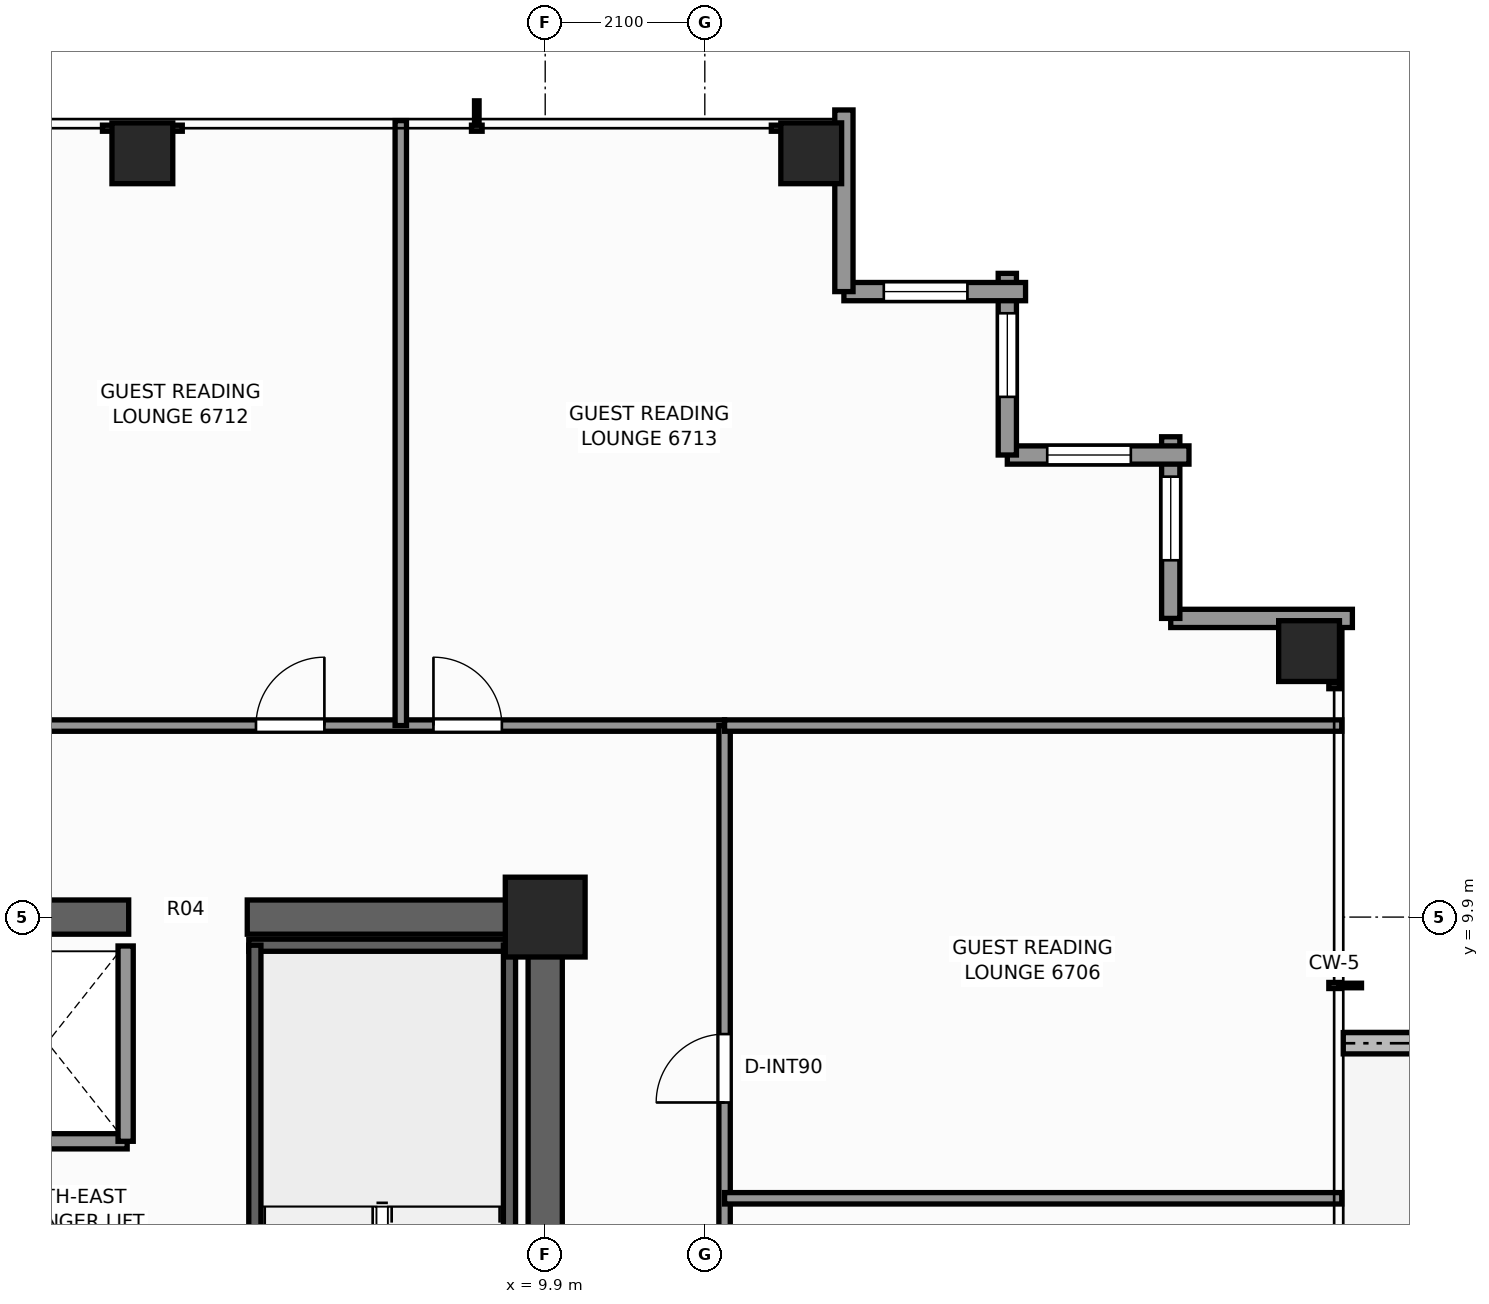
"""IFC4 building model, lengths in metres.
Left out: names, types, materials, properties, quantities, classifications, styles, units other than length and angle.
Written with IfcOpenShell. Run it as: python <this file> out.ifc"""

import sys

from ifc_helpers import new_model, si_unit, direction, frame, frame_2d, origin, origin_2d, place, context, subcontext, project, spatial, rectangle, extrude, element, fill, save


model = new_model("IFC4")
c1 = context("Model", 3, precision=1e-05, world=origin(), true_north=direction((0.0, 1.0)))
c2 = subcontext(c1, "Body", "Model", "MODEL_VIEW")
j1 = project(units=[si_unit("LENGTHUNIT", "METRE"), si_unit("PLANEANGLEUNIT", "RADIAN")], contexts=[c1])
p1 = place(None, origin())
s1 = spatial("IfcSite", under=j1, at=p1, CompositionType="ELEMENT")
p2 = place(p1, origin())
s2 = spatial("IfcBuilding", under=s1, at=p2, CompositionType="ELEMENT")
p3 = place(p2, frame((0.0, 0.0, 229.5)))
s3 = spatial("IfcBuildingStorey", under=s2, at=p3, CompositionType="ELEMENT", Elevation=229.5)
p4 = place(p3, frame((-10.125, 9.9, 0.0), z_axis=(0.0, 0.0, 1.0), x_axis=(1.0, 0.0, 0.0)))
e1 = element("IfcWall", 1, at=p4, inside=s3, PredefinedType="SHEAR", context=c2, shape_type="SweptSolid", body=[
    extrude(rectangle(XDim=14.545, YDim=0.45, at=frame_2d((7.272, 0.0))), origin(), (0.0, 0.0, 1.0), 3.3),
])
p5 = place(p3, frame((5.98, 9.9, 0.0), z_axis=(0.0, 0.0, 1.0), x_axis=(1.0, 0.0, 0.0)))
e2 = element("IfcWall", 2, at=p5, inside=s3, PredefinedType="SHEAR", context=c2, shape_type="SweptSolid", body=[
    extrude(rectangle(XDim=4.145, YDim=0.45, at=frame_2d((2.073, 0.0))), origin(), (0.0, 0.0, 1.0), 3.3),
])
p6 = place(p3, frame((9.9, -3.7, 0.0), z_axis=(0.0, 0.0, 1.0), x_axis=(0.0, 1.0, 0.0)))
e3 = element("IfcWall", 3, at=p6, inside=s3, PredefinedType="SHEAR", context=c2, shape_type="SweptSolid", body=[
    extrude(rectangle(XDim=13.375, YDim=0.45, at=frame_2d((6.688, 0.0))), origin(), (0.0, 0.0, 1.0), 3.3),
])
p7 = place(p6, frame((0.35, 0.0, 0.0)))
e4 = element("IfcOpeningElement", 4, at=p7, cuts=e3, PredefinedType="OPENING", context=c2, shape_type="SweptSolid", body=[
    extrude(rectangle(XDim=1.1, YDim=2.2, at=frame_2d((0.55, 1.1))), frame((0.0, 0.235, 0.0), z_axis=(0.0, -1.0, 0.0), x_axis=(1.0, 0.0, 0.0)), (0.0, 0.0, 1.0), 0.47),
])
p8 = place(p3, frame((9.9, 9.9, 0.0), z_axis=(0.0, 0.0, 1.0), x_axis=(1.0, 0.0, 0.0)))
e5 = element("IfcColumn", 5, at=p8, inside=s3, PredefinedType="COLUMN", context=c2, shape_type="SweptSolid", body=[
    extrude(rectangle(XDim=1.05, YDim=1.05, at=origin_2d()), origin(), (0.0, 0.0, 1.0), 3.3),
])
for number, where, z_axis, x_axis in (
    (6, (4.6, 19.95, 0.0), (0.0, 0.0, 1.0), (1.0, 0.0, 0.0)),
    (7, (13.4, 19.95, 0.0), (0.0, 0.0, 1.0), (1.0, 0.0, 0.0)),
    (8, (19.95, 13.4, 0.0), (0.0, 0.0, 1.0), (1.0, 0.0, 0.0)),
):
    element("IfcColumn", number, at=place(p3, frame(where, z_axis=z_axis, x_axis=x_axis)), inside=s3, PredefinedType="COLUMN", context=c2, shape_type="SweptSolid", body=[
        extrude(rectangle(XDim=0.8, YDim=0.8, at=origin_2d()), origin(), (0.0, 0.0, 1.0), 3.3),
    ])
p9 = place(p3, frame((21.713, 8.24, -0.04), z_axis=(0.0, 0.0, 1.0), x_axis=(-1.0, 0.0, 0.0)))
e9 = element("IfcWall", 9, at=p9, inside=s3, PredefinedType="PARAPET", context=c2, shape_type="SweptSolid", body=[
    extrude(rectangle(XDim=1.313, YDim=0.28, at=frame_2d((0.656, 0.0))), origin(), (0.0, 0.0, 1.0), 0.42),
])
p10 = place(p3, frame((18.13, 13.83, 0.0), z_axis=(0.0, 0.0, 1.0), x_axis=(1.0, 0.0, 0.0)))
e10 = element("IfcWall", 10, at=p10, inside=s3, PredefinedType="STANDARD", context=c2, shape_type="SweptSolid", body=[
    extrude(rectangle(XDim=2.39, YDim=0.24, at=frame_2d((1.195, 0.0))), origin(), (0.0, 0.0, 1.0), 2.333),
])
p11 = place(p3, frame((18.13, 16.22, 0.0), z_axis=(0.0, 0.0, 1.0), x_axis=(0.0, -1.0, 0.0)))
e11 = element("IfcWall", 11, at=p11, inside=s3, PredefinedType="STANDARD", context=c2, shape_type="SweptSolid", body=[
    extrude(rectangle(XDim=2.39, YDim=0.24, at=frame_2d((1.195, 0.0))), origin(), (0.0, 0.0, 1.0), 2.333),
])
p12 = place(p11, frame((0.525, 0.0, 0.65)))
e12 = element("IfcOpeningElement", 12, at=p12, cuts=e11, PredefinedType="OPENING", context=c2, shape_type="SweptSolid", body=[
    extrude(rectangle(XDim=1.1, YDim=1.45, at=frame_2d((0.55, 0.725))), frame((0.0, 0.13, 0.0), z_axis=(0.0, -1.0, 0.0), x_axis=(1.0, 0.0, 0.0)), (0.0, 0.0, 1.0), 0.26),
])
p13 = place(p3, frame((15.98, 15.98, 0.0), z_axis=(0.0, 0.0, 1.0), x_axis=(1.0, 0.0, 0.0)))
e13 = element("IfcWall", 13, at=p13, inside=s3, PredefinedType="STANDARD", context=c2, shape_type="SweptSolid", body=[
    extrude(rectangle(XDim=2.39, YDim=0.24, at=frame_2d((1.195, 0.0))), origin(), (0.0, 0.0, 1.0), 2.333),
])
p14 = place(p13, frame((0.525, 0.0, 0.65)))
e14 = element("IfcOpeningElement", 14, at=p14, cuts=e13, PredefinedType="OPENING", context=c2, shape_type="SweptSolid", body=[
    extrude(rectangle(XDim=1.1, YDim=1.45, at=frame_2d((0.55, 0.725))), frame((0.0, 0.13, 0.0), z_axis=(0.0, -1.0, 0.0), x_axis=(1.0, 0.0, 0.0)), (0.0, 0.0, 1.0), 0.26),
])
p15 = place(p3, frame((15.98, 18.37, 0.0), z_axis=(0.0, 0.0, 1.0), x_axis=(0.0, -1.0, 0.0)))
e15 = element("IfcWall", 15, at=p15, inside=s3, PredefinedType="STANDARD", context=c2, shape_type="SweptSolid", body=[
    extrude(rectangle(XDim=2.39, YDim=0.24, at=frame_2d((1.195, 0.0))), origin(), (0.0, 0.0, 1.0), 2.333),
])
p16 = place(p15, frame((0.525, 0.0, 0.65)))
e16 = element("IfcOpeningElement", 16, at=p16, cuts=e15, PredefinedType="OPENING", context=c2, shape_type="SweptSolid", body=[
    extrude(rectangle(XDim=1.1, YDim=1.45, at=frame_2d((0.55, 0.725))), frame((0.0, 0.13, 0.0), z_axis=(0.0, -1.0, 0.0), x_axis=(1.0, 0.0, 0.0)), (0.0, 0.0, 1.0), 0.26),
])
p17 = place(p3, frame((13.83, 18.13, 0.0), z_axis=(0.0, 0.0, 1.0), x_axis=(1.0, 0.0, 0.0)))
e17 = element("IfcWall", 17, at=p17, inside=s3, PredefinedType="STANDARD", context=c2, shape_type="SweptSolid", body=[
    extrude(rectangle(XDim=2.39, YDim=0.24, at=frame_2d((1.195, 0.0))), origin(), (0.0, 0.0, 1.0), 2.333),
])
p18 = place(p17, frame((0.525, 0.0, 0.65)))
e18 = element("IfcOpeningElement", 18, at=p18, cuts=e17, PredefinedType="OPENING", context=c2, shape_type="SweptSolid", body=[
    extrude(rectangle(XDim=1.1, YDim=1.45, at=frame_2d((0.55, 0.725))), frame((0.0, 0.13, 0.0), z_axis=(0.0, -1.0, 0.0), x_axis=(1.0, 0.0, 0.0)), (0.0, 0.0, 1.0), 0.26),
])
p19 = place(p3, frame((13.83, 20.52, 0.0), z_axis=(0.0, 0.0, 1.0), x_axis=(0.0, -1.0, 0.0)))
e19 = element("IfcWall", 19, at=p19, inside=s3, PredefinedType="STANDARD", context=c2, shape_type="SweptSolid", body=[
    extrude(rectangle(XDim=2.39, YDim=0.24, at=frame_2d((1.195, 0.0))), origin(), (0.0, 0.0, 1.0), 2.333),
])
p20 = place(p3, frame((6.0, 9.53, 0.0), z_axis=(0.0, 0.0, 1.0), x_axis=(1.0, 0.0, 0.0)))
e20 = element("IfcWall", 20, at=p20, inside=s3, PredefinedType="SHEAR", context=c2, shape_type="SweptSolid", body=[
    extrude(rectangle(XDim=3.52, YDim=0.16, at=frame_2d((1.76, 0.0))), origin(), (0.0, 0.0, 1.0), 3.3),
])
for number, where, z_axis, x_axis in (
    (21, (6.08, 1.97, 0.0), (0.0, 0.0, 1.0), (0.0, 1.0, 0.0)),
    (22, (9.43, 1.97, 0.0), (0.0, 0.0, 1.0), (0.0, 1.0, 0.0)),
):
    element("IfcWall", number, at=place(p3, frame(where, z_axis=z_axis, x_axis=x_axis)), inside=s3, PredefinedType="SHEAR", context=c2, shape_type="SweptSolid", body=[
        extrude(rectangle(XDim=7.56, YDim=0.16, at=frame_2d((3.78, 0.0))), origin(), (0.0, 0.0, 1.0), 3.3),
    ])
p21 = place(p3, frame((0.22, 6.95, 0.0), z_axis=(0.0, 0.0, 1.0), x_axis=(1.0, 0.0, 0.0)))
e23 = element("IfcWall", 23, at=p21, inside=s3, PredefinedType="SOLIDWALL", context=c2, shape_type="SweptSolid", body=[
    extrude(rectangle(XDim=4.18, YDim=0.2, at=frame_2d((2.09, 0.0))), origin(), (0.0, 0.0, 1.0), 2.95),
])
p22 = place(p3, frame((4.38, 6.95, 0.0), z_axis=(0.0, 0.0, 1.0), x_axis=(0.0, 1.0, 0.0)))
e24 = element("IfcWall", 24, at=p22, inside=s3, PredefinedType="SOLIDWALL", context=c2, shape_type="SweptSolid", body=[
    extrude(rectangle(XDim=2.57, YDim=0.2, at=frame_2d((1.285, 0.0))), origin(), (0.0, 0.0, 1.0), 2.95),
])
p23 = place(p3, frame((-12.42, 12.42, 0.0), z_axis=(0.0, 0.0, 1.0), x_axis=(1.0, 0.0, 0.0)))
e25 = element("IfcWall", 25, at=p23, inside=s3, PredefinedType="PARTITIONING", context=c2, shape_type="SweptSolid", body=[
    extrude(rectangle(XDim=24.68, YDim=0.15, at=frame_2d((12.34, 0.0))), origin(), (0.0, 0.0, 1.0), 2.239),
])
p24 = place(p23, frame((3.524, 0.0, 0.0)))
e26 = element("IfcOpeningElement", 26, at=p24, cuts=e25, PredefinedType="OPENING", context=c2, shape_type="SweptSolid", body=[
    extrude(rectangle(XDim=0.9, YDim=2.06, at=frame_2d((0.45, 1.03))), frame((0.0, 0.085, 0.0), z_axis=(0.0, -1.0, 0.0), x_axis=(1.0, 0.0, 0.0)), (0.0, 0.0, 1.0), 0.17),
])
p25 = place(p23, frame((5.859, 0.0, 0.0)))
e27 = element("IfcOpeningElement", 27, at=p25, cuts=e25, PredefinedType="OPENING", context=c2, shape_type="SweptSolid", body=[
    extrude(rectangle(XDim=0.9, YDim=2.06, at=frame_2d((0.45, 1.03))), frame((0.0, 0.085, 0.0), z_axis=(0.0, -1.0, 0.0), x_axis=(1.0, 0.0, 0.0)), (0.0, 0.0, 1.0), 0.17),
])
p26 = place(p23, frame((9.538, 0.0, 0.0)))
e28 = element("IfcOpeningElement", 28, at=p26, cuts=e25, PredefinedType="OPENING", context=c2, shape_type="SweptSolid", body=[
    extrude(rectangle(XDim=0.9, YDim=2.06, at=frame_2d((0.45, 1.03))), frame((0.0, 0.085, 0.0), z_axis=(0.0, -1.0, 0.0), x_axis=(1.0, 0.0, 0.0)), (0.0, 0.0, 1.0), 0.17),
])
p27 = place(p23, frame((13.002, 0.0, 0.0)))
e29 = element("IfcOpeningElement", 29, at=p27, cuts=e25, PredefinedType="OPENING", context=c2, shape_type="SweptSolid", body=[
    extrude(rectangle(XDim=0.95, YDim=2.06, at=frame_2d((0.475, 1.03))), frame((0.0, 0.085, 0.0), z_axis=(0.0, -1.0, 0.0), x_axis=(1.0, 0.0, 0.0)), (0.0, 0.0, 1.0), 0.17),
])
p28 = place(p23, frame((18.515, 0.0, 0.0)))
e30 = element("IfcOpeningElement", 30, at=p28, cuts=e25, PredefinedType="OPENING", context=c2, shape_type="SweptSolid", body=[
    extrude(rectangle(XDim=0.9, YDim=2.06, at=frame_2d((0.45, 1.03))), frame((0.0, 0.085, 0.0), z_axis=(0.0, -1.0, 0.0), x_axis=(1.0, 0.0, 0.0)), (0.0, 0.0, 1.0), 0.17),
])
p29 = place(p23, frame((20.85, 0.0, 0.0)))
e31 = element("IfcOpeningElement", 31, at=p29, cuts=e25, PredefinedType="OPENING", context=c2, shape_type="SweptSolid", body=[
    extrude(rectangle(XDim=0.9, YDim=2.06, at=frame_2d((0.45, 1.03))), frame((0.0, 0.085, 0.0), z_axis=(0.0, -1.0, 0.0), x_axis=(1.0, 0.0, 0.0)), (0.0, 0.0, 1.0), 0.17),
])
p30 = place(p3, frame((12.26, -12.42, 0.0), z_axis=(0.0, 0.0, 1.0), x_axis=(0.0, 1.0, 0.0)))
e32 = element("IfcWall", 32, at=p30, inside=s3, PredefinedType="PARTITIONING", context=c2, shape_type="SweptSolid", body=[
    extrude(rectangle(XDim=24.84, YDim=0.15, at=frame_2d((12.42, 0.0))), origin(), (0.0, 0.0, 1.0), 2.239),
])
p31 = place(p30, frame((3.024, 0.0, 0.0)))
e33 = element("IfcOpeningElement", 33, at=p31, cuts=e32, PredefinedType="OPENING", context=c2, shape_type="SweptSolid", body=[
    extrude(rectangle(XDim=0.9, YDim=2.06, at=frame_2d((0.45, 1.03))), frame((0.0, 0.085, 0.0), z_axis=(0.0, -1.0, 0.0), x_axis=(1.0, 0.0, 0.0)), (0.0, 0.0, 1.0), 0.17),
])
p32 = place(p30, frame((5.359, 0.0, 0.0)))
e34 = element("IfcOpeningElement", 34, at=p32, cuts=e32, PredefinedType="OPENING", context=c2, shape_type="SweptSolid", body=[
    extrude(rectangle(XDim=0.9, YDim=2.06, at=frame_2d((0.45, 1.03))), frame((0.0, 0.085, 0.0), z_axis=(0.0, -1.0, 0.0), x_axis=(1.0, 0.0, 0.0)), (0.0, 0.0, 1.0), 0.17),
])
p33 = place(p30, frame((14.0, 0.0, 0.0)))
e35 = element("IfcOpeningElement", 35, at=p33, cuts=e32, PredefinedType="OPENING", context=c2, shape_type="SweptSolid", body=[
    extrude(rectangle(XDim=0.9, YDim=2.06, at=frame_2d((0.45, 1.03))), frame((0.0, 0.085, 0.0), z_axis=(0.0, -1.0, 0.0), x_axis=(1.0, 0.0, 0.0)), (0.0, 0.0, 1.0), 0.17),
])
p34 = place(p30, frame((19.881, 0.0, 0.0)))
e36 = element("IfcOpeningElement", 36, at=p34, cuts=e32, PredefinedType="OPENING", context=c2, shape_type="SweptSolid", body=[
    extrude(rectangle(XDim=0.9, YDim=2.06, at=frame_2d((0.45, 1.03))), frame((0.0, 0.085, 0.0), z_axis=(0.0, -1.0, 0.0), x_axis=(1.0, 0.0, 0.0)), (0.0, 0.0, 1.0), 0.17),
])
p35 = place(p3, frame((12.26, 12.42, 0.0), z_axis=(0.0, 0.0, 1.0), x_axis=(1.0, 0.0, 0.0)))
e37 = element("IfcWall", 37, at=p35, inside=s3, PredefinedType="PARTITIONING", context=c2, shape_type="SweptSolid", body=[
    extrude(rectangle(XDim=8.12, YDim=0.15, at=frame_2d((4.06, 0.0))), origin(), (0.0, 0.0, 1.0), 2.239),
])
p36 = place(p3, frame((12.26, 6.2, 0.0), z_axis=(0.0, 0.0, 1.0), x_axis=(1.0, 0.0, 0.0)))
e38 = element("IfcWall", 38, at=p36, inside=s3, PredefinedType="PARTITIONING", context=c2, shape_type="SweptSolid", body=[
    extrude(rectangle(XDim=8.12, YDim=0.15, at=frame_2d((4.06, 0.0))), origin(), (0.0, 0.0, 1.0), 2.323),
])
p37 = place(p3, frame((8.0, 12.42, 0.0), z_axis=(0.0, 0.0, 1.0), x_axis=(0.0, 1.0, 0.0)))
e39 = element("IfcWall", 39, at=p37, inside=s3, PredefinedType="PARTITIONING", context=c2, shape_type="SweptSolid", body=[
    extrude(rectangle(XDim=7.96, YDim=0.15, at=frame_2d((3.98, 0.0))), origin(), (0.0, 0.0, 1.0), 2.323),
])
p38 = place(p12, origin())
e40 = element("IfcWindow", 40, at=p38, inside=s3, PartitioningType="SINGLE_PANEL", PredefinedType="WINDOW", context=c2, shape_type="SweptSolid", body=[
    extrude(rectangle(XDim=1.1, YDim=1.45, at=frame_2d((0.55, 0.725))), frame((0.0, 0.03, 0.0), z_axis=(0.0, -1.0, 0.0), x_axis=(1.0, 0.0, 0.0)), (0.0, 0.0, 1.0), 0.06),
])
fill(e12, e40)
p39 = place(p14, origin())
e41 = element("IfcWindow", 41, at=p39, inside=s3, PartitioningType="SINGLE_PANEL", PredefinedType="WINDOW", context=c2, shape_type="SweptSolid", body=[
    extrude(rectangle(XDim=1.1, YDim=1.45, at=frame_2d((0.55, 0.725))), frame((0.0, 0.03, 0.0), z_axis=(0.0, -1.0, 0.0), x_axis=(1.0, 0.0, 0.0)), (0.0, 0.0, 1.0), 0.06),
])
fill(e14, e41)
p40 = place(p16, origin())
e42 = element("IfcWindow", 42, at=p40, inside=s3, PartitioningType="SINGLE_PANEL", PredefinedType="WINDOW", context=c2, shape_type="SweptSolid", body=[
    extrude(rectangle(XDim=1.1, YDim=1.45, at=frame_2d((0.55, 0.725))), frame((0.0, 0.03, 0.0), z_axis=(0.0, -1.0, 0.0), x_axis=(1.0, 0.0, 0.0)), (0.0, 0.0, 1.0), 0.06),
])
fill(e16, e42)
p41 = place(p18, origin())
e43 = element("IfcWindow", 43, at=p41, inside=s3, PartitioningType="SINGLE_PANEL", PredefinedType="WINDOW", context=c2, shape_type="SweptSolid", body=[
    extrude(rectangle(XDim=1.1, YDim=1.45, at=frame_2d((0.55, 0.725))), frame((0.0, 0.03, 0.0), z_axis=(0.0, -1.0, 0.0), x_axis=(1.0, 0.0, 0.0)), (0.0, 0.0, 1.0), 0.06),
])
fill(e18, e43)
p42 = place(p34, origin())
e44 = element("IfcDoor", 44, at=p42, inside=s3, OperationType="SINGLE_SWING_LEFT", PredefinedType="DOOR", context=c2, shape_type="SweptSolid", body=[
    extrude(rectangle(XDim=0.9, YDim=2.06, at=frame_2d((0.45, 1.03))), frame((0.0, 0.025, 0.0), z_axis=(0.0, -1.0, 0.0), x_axis=(1.0, 0.0, 0.0)), (0.0, 0.0, 1.0), 0.05),
])
fill(e36, e44)
p43 = place(p28, origin())
e45 = element("IfcDoor", 45, at=p43, inside=s3, OperationType="SINGLE_SWING_RIGHT", PredefinedType="DOOR", context=c2, shape_type="SweptSolid", body=[
    extrude(rectangle(XDim=0.9, YDim=2.06, at=frame_2d((0.45, 1.03))), frame((0.0, 0.025, 0.0), z_axis=(0.0, -1.0, 0.0), x_axis=(1.0, 0.0, 0.0)), (0.0, 0.0, 1.0), 0.05),
])
fill(e30, e45)
p44 = place(p29, origin())
e46 = element("IfcDoor", 46, at=p44, inside=s3, OperationType="SINGLE_SWING_LEFT", PredefinedType="DOOR", context=c2, shape_type="SweptSolid", body=[
    extrude(rectangle(XDim=0.9, YDim=2.06, at=frame_2d((0.45, 1.03))), frame((0.0, 0.025, 0.0), z_axis=(0.0, -1.0, 0.0), x_axis=(1.0, 0.0, 0.0)), (0.0, 0.0, 1.0), 0.05),
])
fill(e31, e46)
save(model, sys.argv[1])
